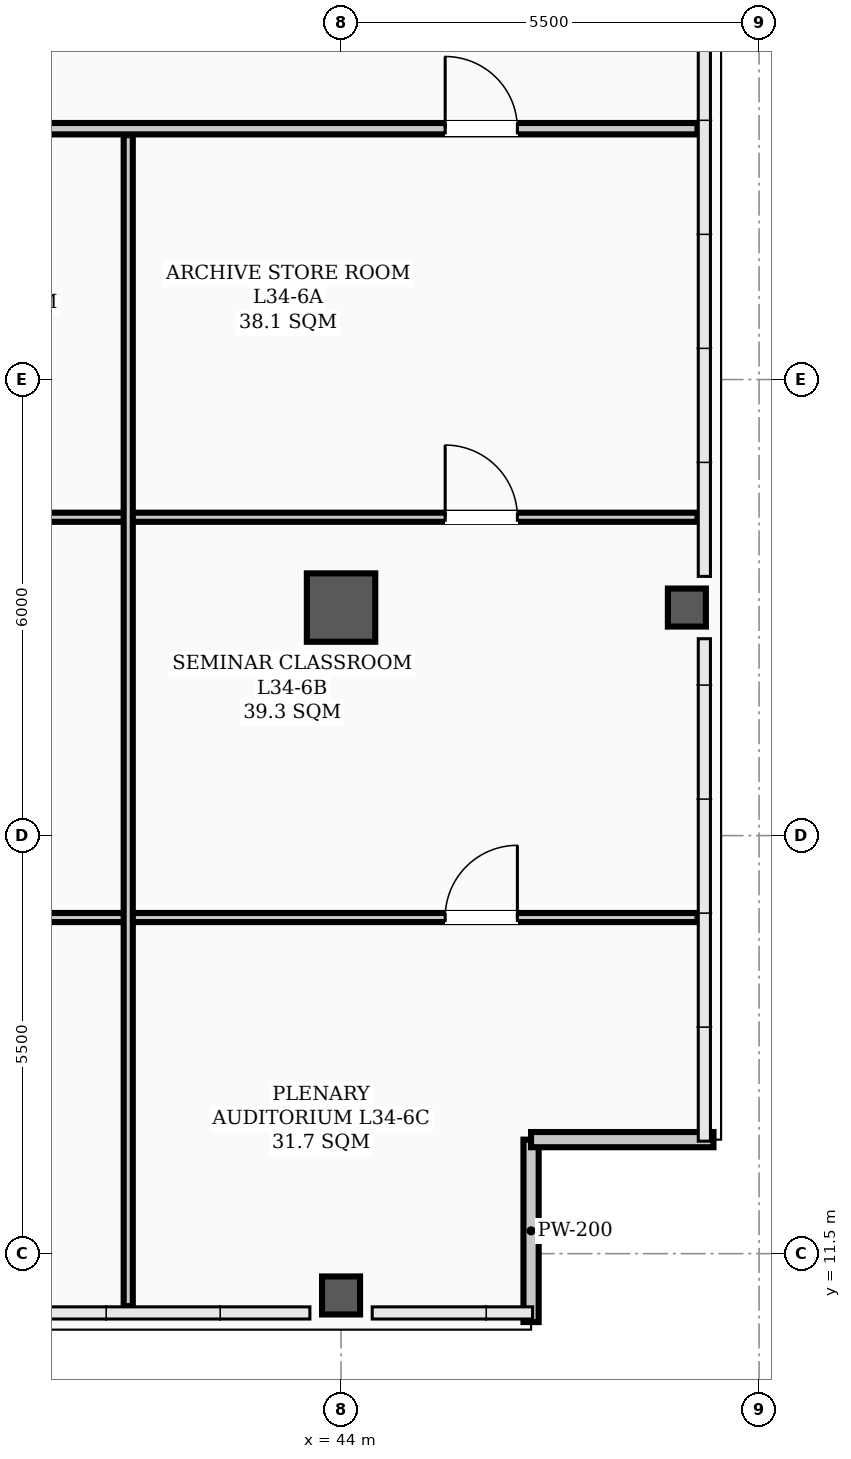
"""IFC4 building model, lengths in metres.
Left out: names, types, materials, properties, quantities, classifications, styles, units other than length and angle.
Written with IfcOpenShell. Run it as: python <this file> out.ifc"""

import sys

from ifc_helpers import new_model, si_unit, direction, frame, frame_2d, origin, origin_2d, place, context, subcontext, project, spatial, rectangle, hollow_rectangle, extrude, element, fill, save


model = new_model("IFC4")
c1 = context("Model", 3, precision=1e-05, world=origin(), true_north=direction((0.0, 1.0)))
c2 = subcontext(c1, "Body", "Model", "MODEL_VIEW")
j1 = project(units=[si_unit("LENGTHUNIT", "METRE"), si_unit("PLANEANGLEUNIT", "RADIAN")], contexts=[c1])
p1 = place(None, origin())
s1 = spatial("IfcSite", under=j1, at=p1, CompositionType="ELEMENT")
p2 = place(p1, origin())
s2 = spatial("IfcBuilding", under=s1, at=p2, CompositionType="ELEMENT")
p3 = place(p2, frame((0.0, 0.0, 138.3)))
s3 = spatial("IfcBuildingStorey", under=s2, at=p3, CompositionType="ELEMENT", Elevation=138.3)
p4 = place(p3, frame((44.0, 20.0, 0.0), z_axis=(0.0, 0.0, 1.0), x_axis=(1.0, 0.0, 0.0)))
e1 = element("IfcColumn", 1, at=p4, inside=s3, PredefinedType="COLUMN", context=c2, shape_type="SweptSolid", body=[
    extrude(hollow_rectangle(XDim=0.9, YDim=0.9, WallThickness=0.035, InnerFilletRadius=0.017, OuterFilletRadius=0.052, at=origin_2d()), origin(), (0.0, 0.0, 1.0), 3.9),
])
p5 = place(p3, frame((44.0, 10.95, 0.0), z_axis=(0.0, 0.0, 1.0), x_axis=(1.0, 0.0, 0.0)))
e2 = element("IfcColumn", 2, at=p5, inside=s3, PredefinedType="COLUMN", context=c2, shape_type="SweptSolid", body=[
    extrude(hollow_rectangle(XDim=0.5, YDim=0.5, WallThickness=0.024, InnerFilletRadius=0.012, OuterFilletRadius=0.036, at=origin_2d()), origin(), (0.0, 0.0, 1.0), 3.66),
])
p6 = place(p3, frame((48.55, 20.0, 0.0), z_axis=(0.0, 0.0, 1.0), x_axis=(1.0, 0.0, 0.0)))
e3 = element("IfcColumn", 3, at=p6, inside=s3, PredefinedType="COLUMN", context=c2, shape_type="SweptSolid", body=[
    extrude(hollow_rectangle(XDim=0.5, YDim=0.5, WallThickness=0.024, InnerFilletRadius=0.012, OuterFilletRadius=0.036, at=origin_2d()), origin(), (0.0, 0.0, 1.0), 3.9),
])
for number, where, z_axis, x_axis in (
    (4, (46.5, 10.6, 0.0), (0.0, 0.0, 1.0), (0.0, 1.0, 0.0)),
    (5, (46.5, 13.0, 0.0), (0.0, 0.0, 1.0), (1.0, 0.0, 0.0)),
):
    element("IfcWall", number, at=place(p3, frame(where, z_axis=z_axis, x_axis=x_axis)), inside=s3, PredefinedType="PARAPET", context=c2, shape_type="SweptSolid", body=[
        extrude(rectangle(XDim=2.4, YDim=0.2, at=frame_2d((1.2, 0.0))), origin(), (0.0, 0.0, 1.0), 1.2),
    ])
p7 = place(p3, frame((2.31, 26.3, 0.0), z_axis=(0.0, 0.0, 1.0), x_axis=(1.0, 0.0, 0.0)))
e6 = element("IfcWall", 6, at=p7, inside=s3, PredefinedType="PARTITIONING", context=c2, shape_type="SweptSolid", body=[
    extrude(rectangle(XDim=46.38, YDim=0.15, at=frame_2d((23.19, 0.0))), origin(), (0.0, 0.0, 1.0), 2.24),
])
p8 = place(p7, frame((12.515, 0.0, 0.0)))
e7 = element("IfcOpeningElement", 7, at=p8, cuts=e6, PredefinedType="OPENING", context=c2, shape_type="SweptSolid", body=[
    extrude(rectangle(XDim=0.95, YDim=2.08, at=frame_2d((0.475, 1.04))), frame((0.0, 0.085, 0.0), z_axis=(0.0, -1.0, 0.0), x_axis=(1.0, 0.0, 0.0)), (0.0, 0.0, 1.0), 0.17),
])
p9 = place(p7, frame((18.615, 0.0, 0.0)))
e8 = element("IfcOpeningElement", 8, at=p9, cuts=e6, PredefinedType="OPENING", context=c2, shape_type="SweptSolid", body=[
    extrude(rectangle(XDim=0.95, YDim=2.08, at=frame_2d((0.475, 1.04))), frame((0.0, 0.085, 0.0), z_axis=(0.0, -1.0, 0.0), x_axis=(1.0, 0.0, 0.0)), (0.0, 0.0, 1.0), 0.17),
])
p10 = place(p7, frame((26.115, 0.0, 0.0)))
e9 = element("IfcOpeningElement", 9, at=p10, cuts=e6, PredefinedType="OPENING", context=c2, shape_type="SweptSolid", body=[
    extrude(rectangle(XDim=0.95, YDim=2.08, at=frame_2d((0.475, 1.04))), frame((0.0, 0.085, 0.0), z_axis=(0.0, -1.0, 0.0), x_axis=(1.0, 0.0, 0.0)), (0.0, 0.0, 1.0), 0.17),
])
p11 = place(p7, frame((31.665, 0.0, 0.0)))
e10 = element("IfcOpeningElement", 10, at=p11, cuts=e6, PredefinedType="OPENING", context=c2, shape_type="SweptSolid", body=[
    extrude(rectangle(XDim=0.95, YDim=2.08, at=frame_2d((0.475, 1.04))), frame((0.0, 0.085, 0.0), z_axis=(0.0, -1.0, 0.0), x_axis=(1.0, 0.0, 0.0)), (0.0, 0.0, 1.0), 0.17),
])
p12 = place(p7, frame((43.06, 0.0, 0.0)))
e11 = element("IfcOpeningElement", 11, at=p12, cuts=e6, PredefinedType="OPENING", context=c2, shape_type="SweptSolid", body=[
    extrude(rectangle(XDim=0.95, YDim=2.08, at=frame_2d((0.475, 1.04))), frame((0.0, 0.085, 0.0), z_axis=(0.0, -1.0, 0.0), x_axis=(1.0, 0.0, 0.0)), (0.0, 0.0, 1.0), 0.17),
])
p13 = place(p3, frame((33.4, 21.188, 0.0), z_axis=(0.0, 0.0, 1.0), x_axis=(1.0, 0.0, 0.0)))
e12 = element("IfcWall", 12, at=p13, inside=s3, PredefinedType="PARTITIONING", context=c2, shape_type="SweptSolid", body=[
    extrude(rectangle(XDim=7.8, YDim=0.12, at=frame_2d((3.9, 0.0))), origin(), (0.0, 0.0, 1.0), 2.24),
])
p14 = place(p13, frame((0.575, 0.0, 0.0)))
e13 = element("IfcOpeningElement", 13, at=p14, cuts=e12, PredefinedType="OPENING", context=c2, shape_type="SweptSolid", body=[
    extrude(rectangle(XDim=0.95, YDim=2.08, at=frame_2d((0.475, 1.04))), frame((0.0, 0.07, 0.0), z_axis=(0.0, -1.0, 0.0), x_axis=(1.0, 0.0, 0.0)), (0.0, 0.0, 1.0), 0.14),
])
p15 = place(p3, frame((33.4, 15.922, 0.0), z_axis=(0.0, 0.0, 1.0), x_axis=(1.0, 0.0, 0.0)))
e14 = element("IfcWall", 14, at=p15, inside=s3, PredefinedType="PARTITIONING", context=c2, shape_type="SweptSolid", body=[
    extrude(rectangle(XDim=7.8, YDim=0.12, at=frame_2d((3.9, 0.0))), origin(), (0.0, 0.0, 1.0), 2.24),
])
p16 = place(p15, frame((0.575, 0.0, 0.0)))
e15 = element("IfcOpeningElement", 15, at=p16, cuts=e14, PredefinedType="OPENING", context=c2, shape_type="SweptSolid", body=[
    extrude(rectangle(XDim=0.95, YDim=2.08, at=frame_2d((0.475, 1.04))), frame((0.0, 0.07, 0.0), z_axis=(0.0, -1.0, 0.0), x_axis=(1.0, 0.0, 0.0)), (0.0, 0.0, 1.0), 0.14),
])
p17 = place(p3, frame((41.2, 21.188, 0.0), z_axis=(0.0, 0.0, 1.0), x_axis=(1.0, 0.0, 0.0)))
e16 = element("IfcWall", 16, at=p17, inside=s3, PredefinedType="PARTITIONING", context=c2, shape_type="SweptSolid", body=[
    extrude(rectangle(XDim=7.49, YDim=0.12, at=frame_2d((3.745, 0.0))), origin(), (0.0, 0.0, 1.0), 2.24),
])
p18 = place(p17, frame((4.17, 0.0, 0.0)))
e17 = element("IfcOpeningElement", 17, at=p18, cuts=e16, PredefinedType="OPENING", context=c2, shape_type="SweptSolid", body=[
    extrude(rectangle(XDim=0.95, YDim=2.08, at=frame_2d((0.475, 1.04))), frame((0.0, 0.07, 0.0), z_axis=(0.0, -1.0, 0.0), x_axis=(1.0, 0.0, 0.0)), (0.0, 0.0, 1.0), 0.14),
])
p19 = place(p3, frame((41.2, 15.922, 0.0), z_axis=(0.0, 0.0, 1.0), x_axis=(1.0, 0.0, 0.0)))
e18 = element("IfcWall", 18, at=p19, inside=s3, PredefinedType="PARTITIONING", context=c2, shape_type="SweptSolid", body=[
    extrude(rectangle(XDim=7.49, YDim=0.12, at=frame_2d((3.745, 0.0))), origin(), (0.0, 0.0, 1.0), 2.24),
])
p20 = place(p19, frame((4.17, 0.0, 0.0)))
e19 = element("IfcOpeningElement", 19, at=p20, cuts=e18, PredefinedType="OPENING", context=c2, shape_type="SweptSolid", body=[
    extrude(rectangle(XDim=0.95, YDim=2.08, at=frame_2d((0.475, 1.04))), frame((0.0, 0.07, 0.0), z_axis=(0.0, -1.0, 0.0), x_axis=(1.0, 0.0, 0.0)), (0.0, 0.0, 1.0), 0.14),
])
p21 = place(p3, frame((41.2, 10.81, 0.0), z_axis=(0.0, 0.0, 1.0), x_axis=(0.0, 1.0, 0.0)))
e20 = element("IfcWall", 20, at=p21, inside=s3, PredefinedType="PARTITIONING", context=c2, shape_type="SweptSolid", body=[
    extrude(rectangle(XDim=15.405, YDim=0.12, at=frame_2d((7.703, 0.0))), origin(), (0.0, 0.0, 1.0), 2.24),
])
p22 = place(p18, origin())
e21 = element("IfcDoor", 21, at=p22, inside=s3, OperationType="SINGLE_SWING_LEFT", PredefinedType="DOOR", context=c2, shape_type="SweptSolid", body=[
    extrude(rectangle(XDim=0.95, YDim=2.08, at=frame_2d((0.475, 1.04))), frame((0.0, 0.025, 0.0), z_axis=(0.0, -1.0, 0.0), x_axis=(1.0, 0.0, 0.0)), (0.0, 0.0, 1.0), 0.05),
])
fill(e17, e21)
p23 = place(p20, origin())
e22 = element("IfcDoor", 22, at=p23, inside=s3, OperationType="SINGLE_SWING_RIGHT", PredefinedType="DOOR", context=c2, shape_type="SweptSolid", body=[
    extrude(rectangle(XDim=0.95, YDim=2.08, at=frame_2d((0.475, 1.04))), frame((0.0, 0.025, 0.0), z_axis=(0.0, -1.0, 0.0), x_axis=(1.0, 0.0, 0.0)), (0.0, 0.0, 1.0), 0.05),
])
fill(e19, e22)
p24 = place(p12, origin())
e23 = element("IfcDoor", 23, at=p24, inside=s3, OperationType="SINGLE_SWING_LEFT", PredefinedType="DOOR", context=c2, shape_type="SweptSolid", body=[
    extrude(rectangle(XDim=0.95, YDim=2.08, at=frame_2d((0.475, 1.04))), frame((0.0, 0.025, 0.0), z_axis=(0.0, -1.0, 0.0), x_axis=(1.0, 0.0, 0.0)), (0.0, 0.0, 1.0), 0.05),
])
fill(e11, e23)
save(model, sys.argv[1])
